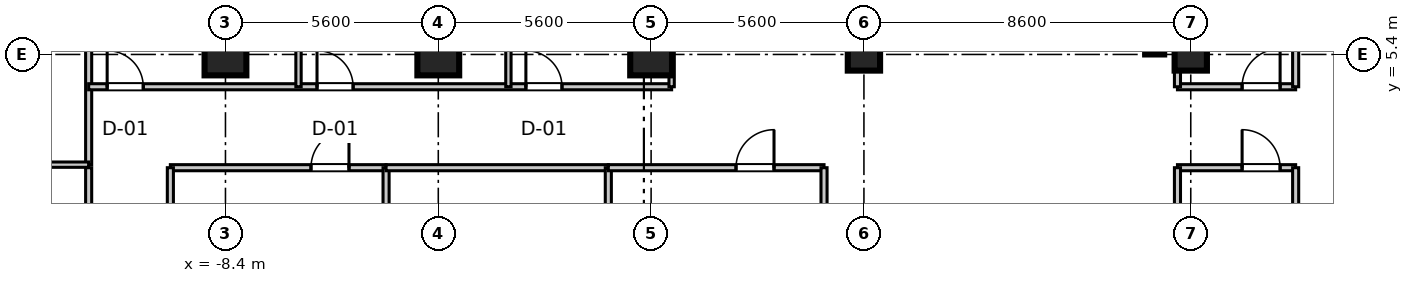
"""IFC4 building model, lengths in metres.
Left out: names, types, materials, properties, quantities, classifications, styles, units other than length and angle.
Written with IfcOpenShell. Run it as: python <this file> out.ifc"""

import sys

from ifc_helpers import new_model, si_unit, direction, frame, frame_2d, origin, origin_2d, place, context, subcontext, project, spatial, rectangle, extrude, source, transform, mapped, element, fill, save


model = new_model("IFC4")
c1 = context("Model", 3, precision=1e-05, world=origin(), true_north=direction((0.0, 1.0)))
c2 = subcontext(c1, "Body", "Model", "MODEL_VIEW")
j1 = project(units=[si_unit("LENGTHUNIT", "METRE"), si_unit("PLANEANGLEUNIT", "RADIAN")], contexts=[c1])
p1 = place(None, origin())
s1 = spatial("IfcSite", under=j1, at=p1, CompositionType="ELEMENT")
p2 = place(p1, origin())
s2 = spatial("IfcBuilding", under=s1, at=p2, CompositionType="ELEMENT")
p3 = place(p2, frame((0.0, 0.0, 156.3)))
s3 = spatial("IfcBuildingStorey", under=s2, at=p3, CompositionType="ELEMENT", Elevation=156.3)
m1 = source(origin(), c2, "Body", "SweptSolid", [
    extrude(rectangle(XDim=1.1, YDim=1.1, at=origin_2d()), origin(), (0.0, 0.0, 1.0), 3.605),
])
for number, where, z_axis, x_axis in (
    (1, (-8.4, 5.4, 0.0), (0.0, 0.0, 1.0), (1.0, 0.0, 0.0)),
    (2, (-2.8, 5.4, 0.0), (0.0, 0.0, 1.0), (1.0, 0.0, 0.0)),
    (3, (2.8, 5.4, 0.0), (0.0, 0.0, 1.0), (1.0, 0.0, 0.0)),
):
    element("IfcColumn", number, at=place(p3, frame(where, z_axis=z_axis, x_axis=x_axis)), inside=s3, PredefinedType="COLUMN", context=c2, shape_type="MappedRepresentation", body=[
        mapped(m1, transform((0.0, 0.0, 0.0), scale=1.0)),
    ])
m2 = source(origin(), c2, "Body", "SweptSolid", [
    extrude(rectangle(XDim=0.85, YDim=0.85, at=origin_2d()), origin(), (0.0, 0.0, 1.0), 3.605),
])
for number, where, z_axis, x_axis in (
    (4, (8.4, 5.4, 0.0), (0.0, 0.0, 1.0), (1.0, 0.0, 0.0)),
    (5, (17.0, 5.4, 0.0), (0.0, 0.0, 1.0), (1.0, 0.0, 0.0)),
):
    element("IfcColumn", number, at=place(p3, frame(where, z_axis=z_axis, x_axis=x_axis)), inside=s3, PredefinedType="PILASTER", context=c2, shape_type="MappedRepresentation", body=[
        mapped(m2, transform((0.0, 0.0, 0.0), scale=1.0)),
    ])
m3 = source(origin(), c2, "Body", "SweptSolid", [
    extrude(rectangle(XDim=11.6, YDim=0.5, at=frame_2d((5.8, 0.0))), origin(), (0.0, 0.0, 1.0), 3.39),
])
p4 = place(p3, frame((16.05, 5.4, 0.0), z_axis=(0.0, 0.0, 1.0), x_axis=(0.0, 1.0, 0.0)))
e6 = element("IfcWall", 6, at=p4, inside=s3, PredefinedType="SHEAR", context=c2, shape_type="MappedRepresentation", body=[
    mapped(m3, transform((0.0, 0.0, 0.0), scale=1.0)),
])
m4 = source(origin(), c2, "Body", "SweptSolid", [
    extrude(rectangle(XDim=3.11, YDim=0.16, at=frame_2d((1.555, 0.0))), origin(), (0.0, 0.0, 1.0), 2.73),
])
p5 = place(p3, frame((16.65, 4.55, 0.0), z_axis=(0.0, 0.0, 1.0), x_axis=(1.0, 0.0, 0.0)))
e7 = element("IfcWall", 7, at=p5, inside=s3, PredefinedType="PARTITIONING", context=c2, shape_type="MappedRepresentation", body=[
    mapped(m4, transform((0.0, 0.0, 0.0), scale=1.0)),
])
p6 = place(p5, frame((1.701, 0.0, 0.0)))
e8 = element("IfcOpeningElement", 8, at=p6, cuts=e7, PredefinedType="OPENING", context=c2, shape_type="SweptSolid", body=[
    extrude(rectangle(XDim=1.0, YDim=2.1, at=frame_2d((0.5, 1.05))), frame((0.0, 0.09, 0.0), z_axis=(0.0, -1.0, 0.0), x_axis=(1.0, 0.0, 0.0)), (0.0, 0.0, 1.0), 0.18),
])
m5 = source(origin(), c2, "Body", "SweptSolid", [
    extrude(rectangle(XDim=17.95, YDim=0.16, at=frame_2d((8.975, 0.0))), origin(), (0.0, 0.0, 1.0), 2.73),
])
p7 = place(p3, frame((16.65, 4.55, 0.0), z_axis=(0.0, 0.0, 1.0), x_axis=(0.0, 1.0, 0.0)))
e9 = element("IfcWall", 9, at=p7, inside=s3, PredefinedType="PARTITIONING", context=c2, shape_type="MappedRepresentation", body=[
    mapped(m5, transform((0.0, 0.0, 0.0), scale=1.0)),
])
m6 = source(origin(), c2, "Body", "SweptSolid", [
    extrude(rectangle(XDim=16.53, YDim=0.16, at=frame_2d((8.265, 0.0))), origin(), (0.0, 0.0, 1.0), 2.73),
])
p8 = place(p3, frame((19.76, 4.55, 0.0), z_axis=(0.0, 0.0, 1.0), x_axis=(0.0, 1.0, 0.0)))
e10 = element("IfcWall", 10, at=p8, inside=s3, PredefinedType="PARTITIONING", context=c2, shape_type="MappedRepresentation", body=[
    mapped(m6, transform((0.0, 0.0, 0.0), scale=1.0)),
])
m7 = source(origin(), c2, "Body", "SweptSolid", [
    extrude(rectangle(XDim=20.0, YDim=0.16, at=frame_2d((10.0, 0.0))), origin(), (0.0, 0.0, 1.0), 2.73),
])
p9 = place(p3, frame((-12.0, 2.5, 0.0), z_axis=(0.0, 0.0, 1.0), x_axis=(0.0, 1.0, 0.0)))
e11 = element("IfcWall", 11, at=p9, inside=s3, PredefinedType="PARTITIONING", context=c2, shape_type="MappedRepresentation", body=[
    mapped(m7, transform((0.0, 0.0, 0.0), scale=1.0)),
])
p10 = place(p9, frame((8.265, 0.0, 0.0)))
e12 = element("IfcOpeningElement", 12, at=p10, cuts=e11, PredefinedType="OPENING", context=c2, shape_type="SweptSolid", body=[
    extrude(rectangle(XDim=0.95, YDim=2.1, at=frame_2d((0.475, 1.05))), frame((0.0, 0.09, 0.0), z_axis=(0.0, -1.0, 0.0), x_axis=(1.0, 0.0, 0.0)), (0.0, 0.0, 1.0), 0.18),
])
m8 = source(origin(), c2, "Body", "SweptSolid", [
    extrude(rectangle(XDim=7.76, YDim=0.14, at=frame_2d((3.88, 0.0))), origin(), (0.0, 0.0, 1.0), 2.73),
])
p11 = place(p3, frame((-19.76, 2.5, 0.0), z_axis=(0.0, 0.0, 1.0), x_axis=(1.0, 0.0, 0.0)))
e13 = element("IfcWall", 13, at=p11, inside=s3, PredefinedType="PARTITIONING", context=c2, shape_type="MappedRepresentation", body=[
    mapped(m8, transform((0.0, 0.0, 0.0), scale=1.0)),
])
m9 = source(origin(), c2, "Body", "SweptSolid", [
    extrude(rectangle(XDim=15.34, YDim=0.16, at=frame_2d((7.67, 0.0))), origin(), (0.0, 0.0, 1.0), 2.73),
])
p12 = place(p3, frame((-12.0, 4.55, 0.0), z_axis=(0.0, 0.0, 1.0), x_axis=(1.0, 0.0, 0.0)))
e14 = element("IfcWall", 14, at=p12, inside=s3, PredefinedType="PARTITIONING", context=c2, shape_type="MappedRepresentation", body=[
    mapped(m9, transform((0.0, 0.0, 0.0), scale=1.0)),
])
p13 = place(p12, frame((0.487, 0.0, 0.0)))
e15 = element("IfcOpeningElement", 15, at=p13, cuts=e14, PredefinedType="OPENING", context=c2, shape_type="SweptSolid", body=[
    extrude(rectangle(XDim=0.95, YDim=2.1, at=frame_2d((0.475, 1.05))), frame((0.0, 0.09, 0.0), z_axis=(0.0, -1.0, 0.0), x_axis=(1.0, 0.0, 0.0)), (0.0, 0.0, 1.0), 0.18),
])
p14 = place(p12, frame((6.009, 0.0, 0.0)))
e16 = element("IfcOpeningElement", 16, at=p14, cuts=e14, PredefinedType="OPENING", context=c2, shape_type="SweptSolid", body=[
    extrude(rectangle(XDim=0.95, YDim=2.1, at=frame_2d((0.475, 1.05))), frame((0.0, 0.09, 0.0), z_axis=(0.0, -1.0, 0.0), x_axis=(1.0, 0.0, 0.0)), (0.0, 0.0, 1.0), 0.18),
])
p15 = place(p12, frame((11.505, 0.0, 0.0)))
e17 = element("IfcOpeningElement", 17, at=p15, cuts=e14, PredefinedType="OPENING", context=c2, shape_type="SweptSolid", body=[
    extrude(rectangle(XDim=0.95, YDim=2.1, at=frame_2d((0.475, 1.05))), frame((0.0, 0.09, 0.0), z_axis=(0.0, -1.0, 0.0), x_axis=(1.0, 0.0, 0.0)), (0.0, 0.0, 1.0), 0.18),
])
m10 = source(origin(), c2, "Body", "SweptSolid", [
    extrude(rectangle(XDim=17.95, YDim=0.14, at=frame_2d((8.975, 0.0))), origin(), (0.0, 0.0, 1.0), 2.73),
])
for number, where, z_axis, x_axis in (
    (18, (3.34, 4.55, 0.0), (0.0, 0.0, 1.0), (0.0, 1.0, 0.0)),
    (19, (-6.478, 4.55, 0.0), (0.0, 0.0, 1.0), (0.0, 1.0, 0.0)),
    (20, (-0.955, 4.55, 0.0), (0.0, 0.0, 1.0), (0.0, 1.0, 0.0)),
):
    element("IfcWall", number, at=place(p3, frame(where, z_axis=z_axis, x_axis=x_axis)), inside=s3, PredefinedType="PARTITIONING", context=c2, shape_type="MappedRepresentation", body=[
        mapped(m10, transform((0.0, 0.0, 0.0), scale=1.0)),
    ])
m11 = source(origin(), c2, "Body", "SweptSolid", [
    extrude(rectangle(XDim=4.84, YDim=0.16, at=frame_2d((2.42, 0.0))), origin(), (0.0, 0.0, 1.0), 2.73),
])
p16 = place(p3, frame((-12.0, -2.42, 0.0), z_axis=(0.0, 0.0, 1.0), x_axis=(0.0, 1.0, 0.0)))
e21 = element("IfcWall", 21, at=p16, inside=s3, PredefinedType="PARTITIONING", context=c2, shape_type="MappedRepresentation", body=[
    mapped(m11, transform((0.0, 0.0, 0.0), scale=1.0)),
])
p17 = place(p16, frame((1.945, 0.0, 0.0)))
e22 = element("IfcOpeningElement", 22, at=p17, cuts=e21, PredefinedType="OPENING", context=c2, shape_type="SweptSolid", body=[
    extrude(rectangle(XDim=0.95, YDim=2.1, at=frame_2d((0.475, 1.05))), frame((0.0, 0.09, 0.0), z_axis=(0.0, -1.0, 0.0), x_axis=(1.0, 0.0, 0.0)), (0.0, 0.0, 1.0), 0.18),
])
m12 = source(origin(), c2, "Body", "SweptSolid", [
    extrude(rectangle(XDim=5.676, YDim=0.16, at=frame_2d((2.838, 0.0))), origin(), (0.0, 0.0, 1.0), 2.73),
])
p18 = place(p3, frame((-9.85, 2.42, 0.0), z_axis=(0.0, 0.0, 1.0), x_axis=(1.0, 0.0, 0.0)))
e23 = element("IfcWall", 23, at=p18, inside=s3, PredefinedType="PARTITIONING", context=c2, shape_type="MappedRepresentation", body=[
    mapped(m12, transform((0.0, 0.0, 0.0), scale=1.0)),
])
p19 = place(p18, frame((3.7, 0.0, 0.0)))
e24 = element("IfcOpeningElement", 24, at=p19, cuts=e23, PredefinedType="OPENING", context=c2, shape_type="SweptSolid", body=[
    extrude(rectangle(XDim=1.0, YDim=2.1, at=frame_2d((0.5, 1.05))), frame((0.0, 0.09, 0.0), z_axis=(0.0, -1.0, 0.0), x_axis=(1.0, 0.0, 0.0)), (0.0, 0.0, 1.0), 0.18),
])
for number, where, z_axis, x_axis in (
    (25, (-9.85, -2.42, 0.0), (0.0, 0.0, 1.0), (0.0, 1.0, 0.0)),
    (26, (-4.174, -2.42, 0.0), (0.0, 0.0, 1.0), (0.0, 1.0, 0.0)),
):
    element("IfcWall", number, at=place(p3, frame(where, z_axis=z_axis, x_axis=x_axis)), inside=s3, PredefinedType="PARTITIONING", context=c2, shape_type="MappedRepresentation", body=[
        mapped(m11, transform((0.0, 0.0, 0.0), scale=1.0)),
    ])
m13 = source(origin(), c2, "Body", "SweptSolid", [
    extrude(rectangle(XDim=5.848, YDim=0.16, at=frame_2d((2.924, 0.0))), origin(), (0.0, 0.0, 1.0), 2.73),
])
p20 = place(p3, frame((-4.174, 2.42, 0.0), z_axis=(0.0, 0.0, 1.0), x_axis=(1.0, 0.0, 0.0)))
e27 = element("IfcWall", 27, at=p20, inside=s3, PredefinedType="PARTITIONING", context=c2, shape_type="MappedRepresentation", body=[
    mapped(m13, transform((0.0, 0.0, 0.0), scale=1.0)),
])
p21 = place(p3, frame((1.674, -2.42, 0.0), z_axis=(0.0, 0.0, 1.0), x_axis=(0.0, 1.0, 0.0)))
e28 = element("IfcWall", 28, at=p21, inside=s3, PredefinedType="PARTITIONING", context=c2, shape_type="MappedRepresentation", body=[
    mapped(m11, transform((0.0, 0.0, 0.0), scale=1.0)),
])
p22 = place(p3, frame((1.674, 2.42, 0.0), z_axis=(0.0, 0.0, 1.0), x_axis=(1.0, 0.0, 0.0)))
e29 = element("IfcWall", 29, at=p22, inside=s3, PredefinedType="PARTITIONING", context=c2, shape_type="MappedRepresentation", body=[
    mapped(m12, transform((0.0, 0.0, 0.0), scale=1.0)),
])
p23 = place(p22, frame((3.36, 0.0, 0.0)))
e30 = element("IfcOpeningElement", 30, at=p23, cuts=e29, PredefinedType="OPENING", context=c2, shape_type="SweptSolid", body=[
    extrude(rectangle(XDim=1.0, YDim=2.1, at=frame_2d((0.5, 1.05))), frame((0.0, 0.09, 0.0), z_axis=(0.0, -1.0, 0.0), x_axis=(1.0, 0.0, 0.0)), (0.0, 0.0, 1.0), 0.18),
])
p24 = place(p3, frame((7.35, -2.42, 0.0), z_axis=(0.0, 0.0, 1.0), x_axis=(0.0, 1.0, 0.0)))
e31 = element("IfcWall", 31, at=p24, inside=s3, PredefinedType="PARTITIONING", context=c2, shape_type="MappedRepresentation", body=[
    mapped(m11, transform((0.0, 0.0, 0.0), scale=1.0)),
])
p25 = place(p3, frame((16.65, 2.42, 0.0), z_axis=(0.0, 0.0, 1.0), x_axis=(1.0, 0.0, 0.0)))
e32 = element("IfcWall", 32, at=p25, inside=s3, PredefinedType="PARTITIONING", context=c2, shape_type="MappedRepresentation", body=[
    mapped(m4, transform((0.0, 0.0, 0.0), scale=1.0)),
])
p26 = place(p25, frame((1.701, 0.0, 0.0)))
e33 = element("IfcOpeningElement", 33, at=p26, cuts=e32, PredefinedType="OPENING", context=c2, shape_type="SweptSolid", body=[
    extrude(rectangle(XDim=1.0, YDim=2.1, at=frame_2d((0.5, 1.05))), frame((0.0, 0.09, 0.0), z_axis=(0.0, -1.0, 0.0), x_axis=(1.0, 0.0, 0.0)), (0.0, 0.0, 1.0), 0.18),
])
for number, where, z_axis, x_axis in (
    (34, (16.65, -2.42, 0.0), (0.0, 0.0, 1.0), (0.0, 1.0, 0.0)),
    (35, (19.76, -2.42, 0.0), (0.0, 0.0, 1.0), (0.0, 1.0, 0.0)),
):
    element("IfcWall", number, at=place(p3, frame(where, z_axis=z_axis, x_axis=x_axis)), inside=s3, PredefinedType="PARTITIONING", context=c2, shape_type="MappedRepresentation", body=[
        mapped(m11, transform((0.0, 0.0, 0.0), scale=1.0)),
    ])
m14 = source(origin(), c2, "Body", "SweptSolid", [
    extrude(rectangle(XDim=1.0, YDim=2.1, at=frame_2d((0.5, 1.05))), frame((0.0, 0.025, 0.0), z_axis=(0.0, -1.0, 0.0), x_axis=(1.0, 0.0, 0.0)), (0.0, 0.0, 1.0), 0.05),
])
p27 = place(p6, origin())
e36 = element("IfcDoor", 36, at=p27, inside=s3, OperationType="SINGLE_SWING_RIGHT", PredefinedType="DOOR", context=c2, shape_type="MappedRepresentation", body=[
    mapped(m14, transform((0.0, 0.0, 0.0), scale=1.0)),
])
fill(e8, e36)
m15 = source(origin(), c2, "Body", "SweptSolid", [
    extrude(rectangle(XDim=0.95, YDim=2.1, at=frame_2d((0.475, 1.05))), frame((0.0, 0.025, 0.0), z_axis=(0.0, -1.0, 0.0), x_axis=(1.0, 0.0, 0.0)), (0.0, 0.0, 1.0), 0.05),
])
p28 = place(p13, origin())
e37 = element("IfcDoor", 37, at=p28, inside=s3, OperationType="SINGLE_SWING_LEFT", PredefinedType="DOOR", context=c2, shape_type="MappedRepresentation", body=[
    mapped(m15, transform((0.0, 0.0, 0.0), scale=1.0)),
])
fill(e15, e37)
p29 = place(p14, origin())
e38 = element("IfcDoor", 38, at=p29, inside=s3, OperationType="SINGLE_SWING_LEFT", PredefinedType="DOOR", context=c2, shape_type="MappedRepresentation", body=[
    mapped(m15, transform((0.0, 0.0, 0.0), scale=1.0)),
])
fill(e16, e38)
p30 = place(p15, origin())
e39 = element("IfcDoor", 39, at=p30, inside=s3, OperationType="SINGLE_SWING_LEFT", PredefinedType="DOOR", context=c2, shape_type="MappedRepresentation", body=[
    mapped(m15, transform((0.0, 0.0, 0.0), scale=1.0)),
])
fill(e17, e39)
p31 = place(p19, frame((1.0, 0.0, 0.0), z_axis=(0.0, 0.0, 1.0), x_axis=(-1.0, 0.0, 0.0)))
e40 = element("IfcDoor", 40, at=p31, inside=s3, OperationType="SINGLE_SWING_RIGHT", PredefinedType="DOOR", context=c2, shape_type="MappedRepresentation", body=[
    mapped(m14, transform((0.0, 0.0, 0.0), scale=1.0)),
])
fill(e24, e40)
p32 = place(p23, frame((1.0, 0.0, 0.0), z_axis=(0.0, 0.0, 1.0), x_axis=(-1.0, 0.0, 0.0)))
e41 = element("IfcDoor", 41, at=p32, inside=s3, OperationType="SINGLE_SWING_RIGHT", PredefinedType="DOOR", context=c2, shape_type="MappedRepresentation", body=[
    mapped(m14, transform((0.0, 0.0, 0.0), scale=1.0)),
])
fill(e30, e41)
p33 = place(p26, frame((1.0, 0.0, 0.0), z_axis=(0.0, 0.0, 1.0), x_axis=(-1.0, 0.0, 0.0)))
e42 = element("IfcDoor", 42, at=p33, inside=s3, OperationType="SINGLE_SWING_LEFT", PredefinedType="DOOR", context=c2, shape_type="MappedRepresentation", body=[
    mapped(m14, transform((0.0, 0.0, 0.0), scale=1.0)),
])
fill(e33, e42)
save(model, sys.argv[1])
